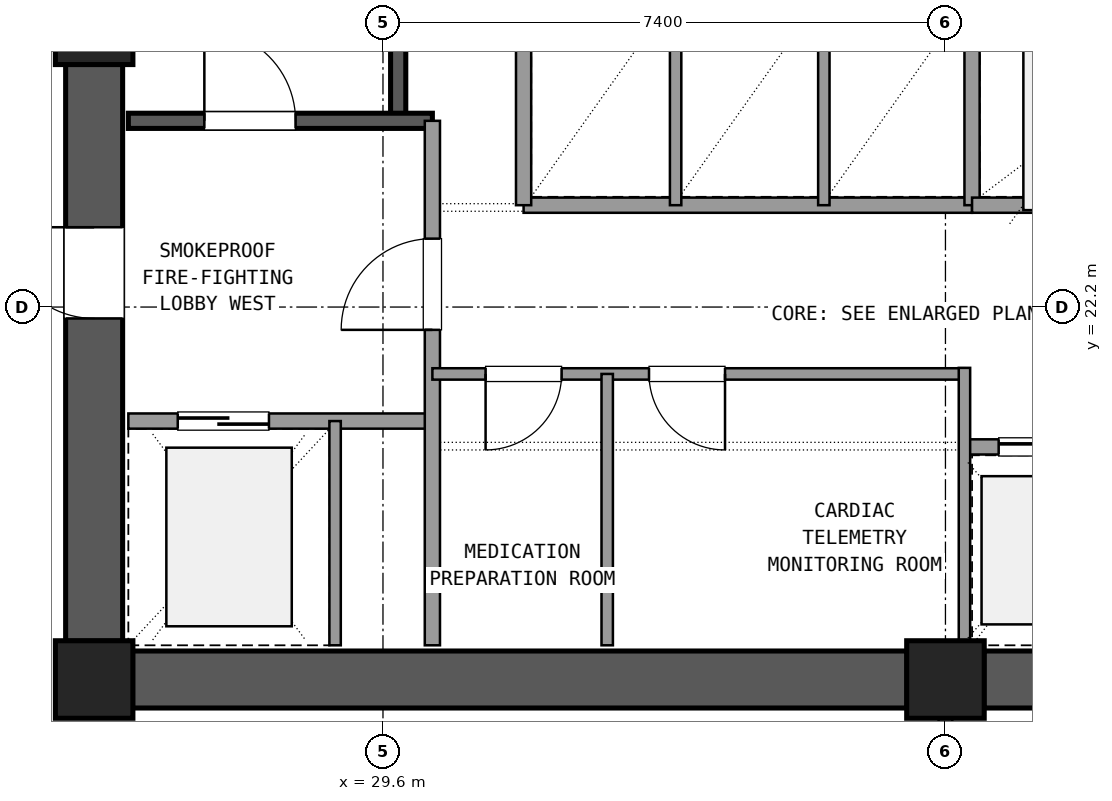
"""IFC4 building model, lengths in metres.
Left out: names, types, materials, properties, quantities, classifications, styles, units other than length and angle.
Written with IfcOpenShell. Run it as: python <this file> out.ifc"""

import sys

from ifc_helpers import new_model, si_unit, direction, frame, frame_2d, origin, origin_2d, place, context, subcontext, project, spatial, rectangle, extrude, element, fill, save


model = new_model("IFC4")
c1 = context("Model", 3, precision=1e-05, world=origin(), true_north=direction((0.0, 1.0)))
c2 = subcontext(c1, "Body", "Model", "MODEL_VIEW")
j1 = project(units=[si_unit("LENGTHUNIT", "METRE"), si_unit("PLANEANGLEUNIT", "RADIAN")], contexts=[c1])
p1 = place(None, origin())
s1 = spatial("IfcSite", under=j1, at=p1, CompositionType="ELEMENT")
p2 = place(p1, origin())
s2 = spatial("IfcBuilding", under=s1, at=p2, CompositionType="ELEMENT")
p3 = place(p2, frame((0.0, 0.0, 84.78)))
s3 = spatial("IfcBuildingStorey", under=s2, at=p3, CompositionType="ELEMENT", Elevation=84.78)
for number, where, z_axis, x_axis in (
    (1, (25.8, 17.3, 0.0), (0.0, 0.0, 1.0), (1.0, 0.0, 0.0)),
    (2, (37.0, 17.3, 0.0), (0.0, 0.0, 1.0), (1.0, 0.0, 0.0)),
    (3, (25.8, 25.9, 0.0), (0.0, 0.0, 1.0), (1.0, 0.0, 0.0)),
):
    element("IfcColumn", number, at=place(p3, frame(where, z_axis=z_axis, x_axis=x_axis)), inside=s3, PredefinedType="COLUMN", context=c2, shape_type="SweptSolid", body=[
        extrude(rectangle(XDim=1.02, YDim=1.02, at=origin_2d()), origin(), (0.0, 0.0, 1.0), 3.6),
    ])
for number, where, z_axis, x_axis in (
    (4, (26.305, 17.3, 0.0), (0.0, 0.0, 1.0), (1.0, 0.0, 0.0)),
    (5, (37.505, 17.3, 0.0), (0.0, 0.0, 1.0), (1.0, 0.0, 0.0)),
):
    element("IfcWall", number, at=place(p3, frame(where, z_axis=z_axis, x_axis=x_axis)), inside=s3, PredefinedType="SHEAR", context=c2, shape_type="SweptSolid", body=[
        extrude(rectangle(XDim=10.19, YDim=0.75, at=frame_2d((5.095, 0.0))), origin(), (0.0, 0.0, 1.0), 3.32),
    ])
p4 = place(p3, frame((25.8, 25.395, 0.0), z_axis=(0.0, 0.0, 1.0), x_axis=(0.0, -1.0, 0.0)))
e6 = element("IfcWall", 6, at=p4, inside=s3, PredefinedType="SHEAR", context=c2, shape_type="SweptSolid", body=[
    extrude(rectangle(XDim=7.59, YDim=0.75, at=frame_2d((3.795, 0.0))), origin(), (0.0, 0.0, 1.0), 3.32),
])
p5 = place(p4, frame((2.145, 0.0, 0.0)))
e7 = element("IfcOpeningElement", 7, at=p5, cuts=e6, PredefinedType="OPENING", context=c2, shape_type="SweptSolid", body=[
    extrude(rectangle(XDim=1.2, YDim=2.15, at=frame_2d((0.6, 1.075))), frame((0.0, 0.385, 0.0), z_axis=(0.0, -1.0, 0.0), x_axis=(1.0, 0.0, 0.0)), (0.0, 0.0, 1.0), 0.77),
])
p6 = place(p3, frame((29.8, 24.65, 0.0), z_axis=(0.0, 0.0, 1.0), x_axis=(0.0, 1.0, 0.0)))
e8 = element("IfcWall", 8, at=p6, inside=s3, PredefinedType="SHEAR", context=c2, shape_type="SweptSolid", body=[
    extrude(rectangle(XDim=9.4, YDim=0.2, at=frame_2d((4.7, 0.0))), origin(), (0.0, 0.0, 1.0), 3.32),
])
p7 = place(p3, frame((26.25, 24.65, 0.0), z_axis=(0.0, 0.0, 1.0), x_axis=(1.0, 0.0, 0.0)))
e9 = element("IfcWall", 9, at=p7, inside=s3, PredefinedType="SHEAR", context=c2, shape_type="SweptSolid", body=[
    extrude(rectangle(XDim=4.0, YDim=0.2, at=frame_2d((2.0, 0.0))), origin(), (0.0, 0.0, 1.0), 3.32),
])
p8 = place(p7, frame((1.0, 0.0, 0.0)))
e10 = element("IfcOpeningElement", 10, at=p8, cuts=e9, PredefinedType="OPENING", context=c2, shape_type="SweptSolid", body=[
    extrude(rectangle(XDim=1.2, YDim=2.15, at=frame_2d((0.6, 1.075))), frame((0.0, 0.11, 0.0), z_axis=(0.0, -1.0, 0.0), x_axis=(1.0, 0.0, 0.0)), (0.0, 0.0, 1.0), 0.22),
])
p9 = place(p3, frame((26.25, 20.7, 0.0), z_axis=(0.0, 0.0, 1.0), x_axis=(1.0, 0.0, 0.0)))
e11 = element("IfcWall", 11, at=p9, inside=s3, PredefinedType="SOLIDWALL", context=c2, shape_type="SweptSolid", body=[
    extrude(rectangle(XDim=4.0, YDim=0.2, at=frame_2d((2.0, 0.0))), origin(), (0.0, 0.0, 1.0), 2.61),
])
p10 = place(p9, frame((0.65, 0.0, 0.0)))
e12 = element("IfcOpeningElement", 12, at=p10, cuts=e11, PredefinedType="OPENING", context=c2, shape_type="SweptSolid", body=[
    extrude(rectangle(XDim=1.2, YDim=2.15, at=frame_2d((0.6, 1.075))), frame((0.0, 0.11, 0.0), z_axis=(0.0, -1.0, 0.0), x_axis=(1.0, 0.0, 0.0)), (0.0, 0.0, 1.0), 0.22),
])
p11 = place(p3, frame((30.25, 17.75, 0.0), z_axis=(0.0, 0.0, 1.0), x_axis=(0.0, 1.0, 0.0)))
e13 = element("IfcWall", 13, at=p11, inside=s3, PredefinedType="SOLIDWALL", context=c2, shape_type="SweptSolid", body=[
    extrude(rectangle(XDim=6.9, YDim=0.2, at=frame_2d((3.45, 0.0))), origin(), (0.0, 0.0, 1.0), 2.61),
])
p12 = place(p11, frame((4.15, 0.0, 0.0)))
e14 = element("IfcOpeningElement", 14, at=p12, cuts=e13, PredefinedType="OPENING", context=c2, shape_type="SweptSolid", body=[
    extrude(rectangle(XDim=1.2, YDim=2.15, at=frame_2d((0.6, 1.075))), frame((0.0, 0.11, 0.0), z_axis=(0.0, -1.0, 0.0), x_axis=(1.0, 0.0, 0.0)), (0.0, 0.0, 1.0), 0.22),
])
p13 = place(p3, frame((28.97, 17.75, 0.0), z_axis=(0.0, 0.0, 1.0), x_axis=(0.0, 1.0, 0.0)))
e15 = element("IfcWall", 15, at=p13, inside=s3, PredefinedType="PARTITIONING", context=c2, shape_type="SweptSolid", body=[
    extrude(rectangle(XDim=2.95, YDim=0.15, at=frame_2d((1.475, 0.0))), origin(), (0.0, 0.0, 1.0), 2.61),
])
p14 = place(p3, frame((30.25, 21.32, 0.0), z_axis=(0.0, 0.0, 1.0), x_axis=(1.0, 0.0, 0.0)))
e16 = element("IfcWall", 16, at=p14, inside=s3, PredefinedType="PARTITIONING", context=c2, shape_type="SweptSolid", body=[
    extrude(rectangle(XDim=7.0, YDim=0.15, at=frame_2d((3.5, 0.0))), origin(), (0.0, 0.0, 1.0), 2.61),
])
p15 = place(p14, frame((0.7, 0.0, 0.0)))
e17 = element("IfcOpeningElement", 17, at=p15, cuts=e16, PredefinedType="OPENING", context=c2, shape_type="SweptSolid", body=[
    extrude(rectangle(XDim=1.0, YDim=2.15, at=frame_2d((0.5, 1.075))), frame((0.0, 0.085, 0.0), z_axis=(0.0, -1.0, 0.0), x_axis=(1.0, 0.0, 0.0)), (0.0, 0.0, 1.0), 0.17),
])
p16 = place(p14, frame((2.85, 0.0, 0.0)))
e18 = element("IfcOpeningElement", 18, at=p16, cuts=e16, PredefinedType="OPENING", context=c2, shape_type="SweptSolid", body=[
    extrude(rectangle(XDim=1.0, YDim=2.15, at=frame_2d((0.5, 1.075))), frame((0.0, 0.085, 0.0), z_axis=(0.0, -1.0, 0.0), x_axis=(1.0, 0.0, 0.0)), (0.0, 0.0, 1.0), 0.17),
])
p17 = place(p3, frame((32.55, 17.75, 0.0), z_axis=(0.0, 0.0, 1.0), x_axis=(0.0, 1.0, 0.0)))
e19 = element("IfcWall", 19, at=p17, inside=s3, PredefinedType="PARTITIONING", context=c2, shape_type="SweptSolid", body=[
    extrude(rectangle(XDim=3.57, YDim=0.15, at=frame_2d((1.785, 0.0))), origin(), (0.0, 0.0, 1.0), 2.61),
])
p18 = place(p3, frame((37.25, 20.36, 0.0), z_axis=(0.0, 0.0, 1.0), x_axis=(1.0, 0.0, 0.0)))
e20 = element("IfcWall", 20, at=p18, inside=s3, PredefinedType="SOLIDWALL", context=c2, shape_type="SweptSolid", body=[
    extrude(rectangle(XDim=6.1, YDim=0.2, at=frame_2d((3.05, 0.0))), origin(), (0.0, 0.0, 1.0), 2.61),
])
p19 = place(p18, frame((0.45, 0.0, 0.0)))
e21 = element("IfcOpeningElement", 21, at=p19, cuts=e20, PredefinedType="OPENING", context=c2, shape_type="SweptSolid", body=[
    extrude(rectangle(XDim=1.1, YDim=2.15, at=frame_2d((0.55, 1.075))), frame((0.0, 0.11, 0.0), z_axis=(0.0, -1.0, 0.0), x_axis=(1.0, 0.0, 0.0)), (0.0, 0.0, 1.0), 0.22),
])
p20 = place(p18, frame((2.5, 0.0, 0.0)))
e22 = element("IfcOpeningElement", 22, at=p20, cuts=e20, PredefinedType="OPENING", context=c2, shape_type="SweptSolid", body=[
    extrude(rectangle(XDim=1.1, YDim=2.15, at=frame_2d((0.55, 1.075))), frame((0.0, 0.11, 0.0), z_axis=(0.0, -1.0, 0.0), x_axis=(1.0, 0.0, 0.0)), (0.0, 0.0, 1.0), 0.22),
])
p21 = place(p18, frame((4.55, 0.0, 0.0)))
e23 = element("IfcOpeningElement", 23, at=p21, cuts=e20, PredefinedType="OPENING", context=c2, shape_type="SweptSolid", body=[
    extrude(rectangle(XDim=1.1, YDim=2.15, at=frame_2d((0.55, 1.075))), frame((0.0, 0.11, 0.0), z_axis=(0.0, -1.0, 0.0), x_axis=(1.0, 0.0, 0.0)), (0.0, 0.0, 1.0), 0.22),
])
p22 = place(p3, frame((37.25, 17.75, 0.0), z_axis=(0.0, 0.0, 1.0), x_axis=(0.0, 1.0, 0.0)))
e24 = element("IfcWall", 24, at=p22, inside=s3, PredefinedType="PARTITIONING", context=c2, shape_type="SweptSolid", body=[
    extrude(rectangle(XDim=3.65, YDim=0.15, at=frame_2d((1.825, 0.0))), origin(), (0.0, 0.0, 1.0), 2.61),
])
p23 = place(p3, frame((31.45, 23.54, 0.0), z_axis=(0.0, 0.0, 1.0), x_axis=(1.0, 0.0, 0.0)))
e25 = element("IfcWall", 25, at=p23, inside=s3, PredefinedType="SOLIDWALL", context=c2, shape_type="SweptSolid", body=[
    extrude(rectangle(XDim=5.9, YDim=0.2, at=frame_2d((2.95, 0.0))), origin(), (0.0, 0.0, 1.0), 2.61),
])
p24 = place(p3, frame((31.45, 23.54, 0.0), z_axis=(0.0, 0.0, 1.0), x_axis=(0.0, 1.0, 0.0)))
e26 = element("IfcWall", 26, at=p24, inside=s3, PredefinedType="SOLIDWALL", context=c2, shape_type="SweptSolid", body=[
    extrude(rectangle(XDim=2.81, YDim=0.2, at=frame_2d((1.405, 0.0))), origin(), (0.0, 0.0, 1.0), 2.61),
])
for number, where, z_axis, x_axis in (
    (27, (33.45, 23.54, 0.0), (0.0, 0.0, 1.0), (0.0, 1.0, 0.0)),
    (28, (35.4, 23.54, 0.0), (0.0, 0.0, 1.0), (0.0, 1.0, 0.0)),
):
    element("IfcWall", number, at=place(p3, frame(where, z_axis=z_axis, x_axis=x_axis)), inside=s3, PredefinedType="PARTITIONING", context=c2, shape_type="SweptSolid", body=[
        extrude(rectangle(XDim=2.81, YDim=0.15, at=frame_2d((1.405, 0.0))), origin(), (0.0, 0.0, 1.0), 2.61),
    ])
p25 = place(p3, frame((37.35, 23.54, 0.0), z_axis=(0.0, 0.0, 1.0), x_axis=(0.0, 1.0, 0.0)))
e29 = element("IfcWall", 29, at=p25, inside=s3, PredefinedType="SOLIDWALL", context=c2, shape_type="SweptSolid", body=[
    extrude(rectangle(XDim=6.82, YDim=0.2, at=frame_2d((3.41, 0.0))), origin(), (0.0, 0.0, 1.0), 2.61),
])
p26 = place(p3, frame((37.35, 23.54, 0.0), z_axis=(0.0, 0.0, 1.0), x_axis=(1.0, 0.0, 0.0)))
e30 = element("IfcWall", 30, at=p26, inside=s3, PredefinedType="SOLIDWALL", context=c2, shape_type="SweptSolid", body=[
    extrude(rectangle(XDim=3.05, YDim=0.2, at=frame_2d((1.525, 0.0))), origin(), (0.0, 0.0, 1.0), 2.61),
])
p27 = place(p3, frame((37.0, 13.64, 0.0), z_axis=(0.0, 0.0, 1.0), x_axis=(0.0, 1.0, 0.0)))
e31 = element("IfcWall", 31, at=p27, inside=s3, PredefinedType="PARTITIONING", context=c2, shape_type="SweptSolid", body=[
    extrude(rectangle(XDim=3.21, YDim=0.18, at=frame_2d((1.605, 0.0))), origin(), (0.0, 0.0, 1.0), 2.61),
])
p28 = place(p27, frame((0.605, 0.0, 0.0)))
e32 = element("IfcOpeningElement", 32, at=p28, cuts=e31, PredefinedType="OPENING", context=c2, shape_type="SweptSolid", body=[
    extrude(rectangle(XDim=2.0, YDim=2.2, at=frame_2d((1.0, 1.1))), frame((0.0, 0.1, 0.0), z_axis=(0.0, -1.0, 0.0), x_axis=(1.0, 0.0, 0.0)), (0.0, 0.0, 1.0), 0.2),
])
p29 = place(p8, origin())
e33 = element("IfcDoor", 33, at=p29, inside=s3, OperationType="SINGLE_SWING_LEFT", PredefinedType="DOOR", context=c2, shape_type="SweptSolid", body=[
    extrude(rectangle(XDim=1.2, YDim=2.15, at=frame_2d((0.6, 1.075))), frame((0.0, 0.025, 0.0), z_axis=(0.0, -1.0, 0.0), x_axis=(1.0, 0.0, 0.0)), (0.0, 0.0, 1.0), 0.05),
])
fill(e10, e33)
p30 = place(p10, origin())
e34 = element("IfcDoor", 34, at=p30, inside=s3, OperationType="SLIDING_TO_LEFT", PredefinedType="DOOR", context=c2, shape_type="SweptSolid", body=[
    extrude(rectangle(XDim=1.2, YDim=2.15, at=frame_2d((0.6, 1.075))), frame((0.0, 0.025, 0.0), z_axis=(0.0, -1.0, 0.0), x_axis=(1.0, 0.0, 0.0)), (0.0, 0.0, 1.0), 0.05),
])
fill(e12, e34)
p31 = place(p12, origin())
e35 = element("IfcDoor", 35, at=p31, inside=s3, OperationType="SINGLE_SWING_LEFT", PredefinedType="DOOR", context=c2, shape_type="SweptSolid", body=[
    extrude(rectangle(XDim=1.2, YDim=2.15, at=frame_2d((0.6, 1.075))), frame((0.0, 0.025, 0.0), z_axis=(0.0, -1.0, 0.0), x_axis=(1.0, 0.0, 0.0)), (0.0, 0.0, 1.0), 0.05),
])
fill(e14, e35)
p32 = place(p5, frame((1.2, 0.0, 0.0), z_axis=(0.0, 0.0, 1.0), x_axis=(-1.0, 0.0, 0.0)))
e36 = element("IfcDoor", 36, at=p32, inside=s3, OperationType="SINGLE_SWING_LEFT", PredefinedType="DOOR", context=c2, shape_type="SweptSolid", body=[
    extrude(rectangle(XDim=1.2, YDim=2.15, at=frame_2d((0.6, 1.075))), frame((0.0, 0.025, 0.0), z_axis=(0.0, -1.0, 0.0), x_axis=(1.0, 0.0, 0.0)), (0.0, 0.0, 1.0), 0.05),
])
fill(e7, e36)
p33 = place(p15, frame((1.0, 0.0, 0.0), z_axis=(0.0, 0.0, 1.0), x_axis=(-1.0, 0.0, 0.0)))
e37 = element("IfcDoor", 37, at=p33, inside=s3, OperationType="SINGLE_SWING_LEFT", PredefinedType="DOOR", context=c2, shape_type="SweptSolid", body=[
    extrude(rectangle(XDim=1.0, YDim=2.15, at=frame_2d((0.5, 1.075))), frame((0.0, 0.025, 0.0), z_axis=(0.0, -1.0, 0.0), x_axis=(1.0, 0.0, 0.0)), (0.0, 0.0, 1.0), 0.05),
])
fill(e17, e37)
p34 = place(p16, frame((1.0, 0.0, 0.0), z_axis=(0.0, 0.0, 1.0), x_axis=(-1.0, 0.0, 0.0)))
e38 = element("IfcDoor", 38, at=p34, inside=s3, OperationType="SINGLE_SWING_RIGHT", PredefinedType="DOOR", context=c2, shape_type="SweptSolid", body=[
    extrude(rectangle(XDim=1.0, YDim=2.15, at=frame_2d((0.5, 1.075))), frame((0.0, 0.025, 0.0), z_axis=(0.0, -1.0, 0.0), x_axis=(1.0, 0.0, 0.0)), (0.0, 0.0, 1.0), 0.05),
])
fill(e18, e38)
p35 = place(p19, origin())
e39 = element("IfcDoor", 39, at=p35, inside=s3, OperationType="SLIDING_TO_LEFT", PredefinedType="DOOR", context=c2, shape_type="SweptSolid", body=[
    extrude(rectangle(XDim=1.1, YDim=2.15, at=frame_2d((0.55, 1.075))), frame((0.0, 0.025, 0.0), z_axis=(0.0, -1.0, 0.0), x_axis=(1.0, 0.0, 0.0)), (0.0, 0.0, 1.0), 0.05),
])
fill(e21, e39)
save(model, sys.argv[1])
